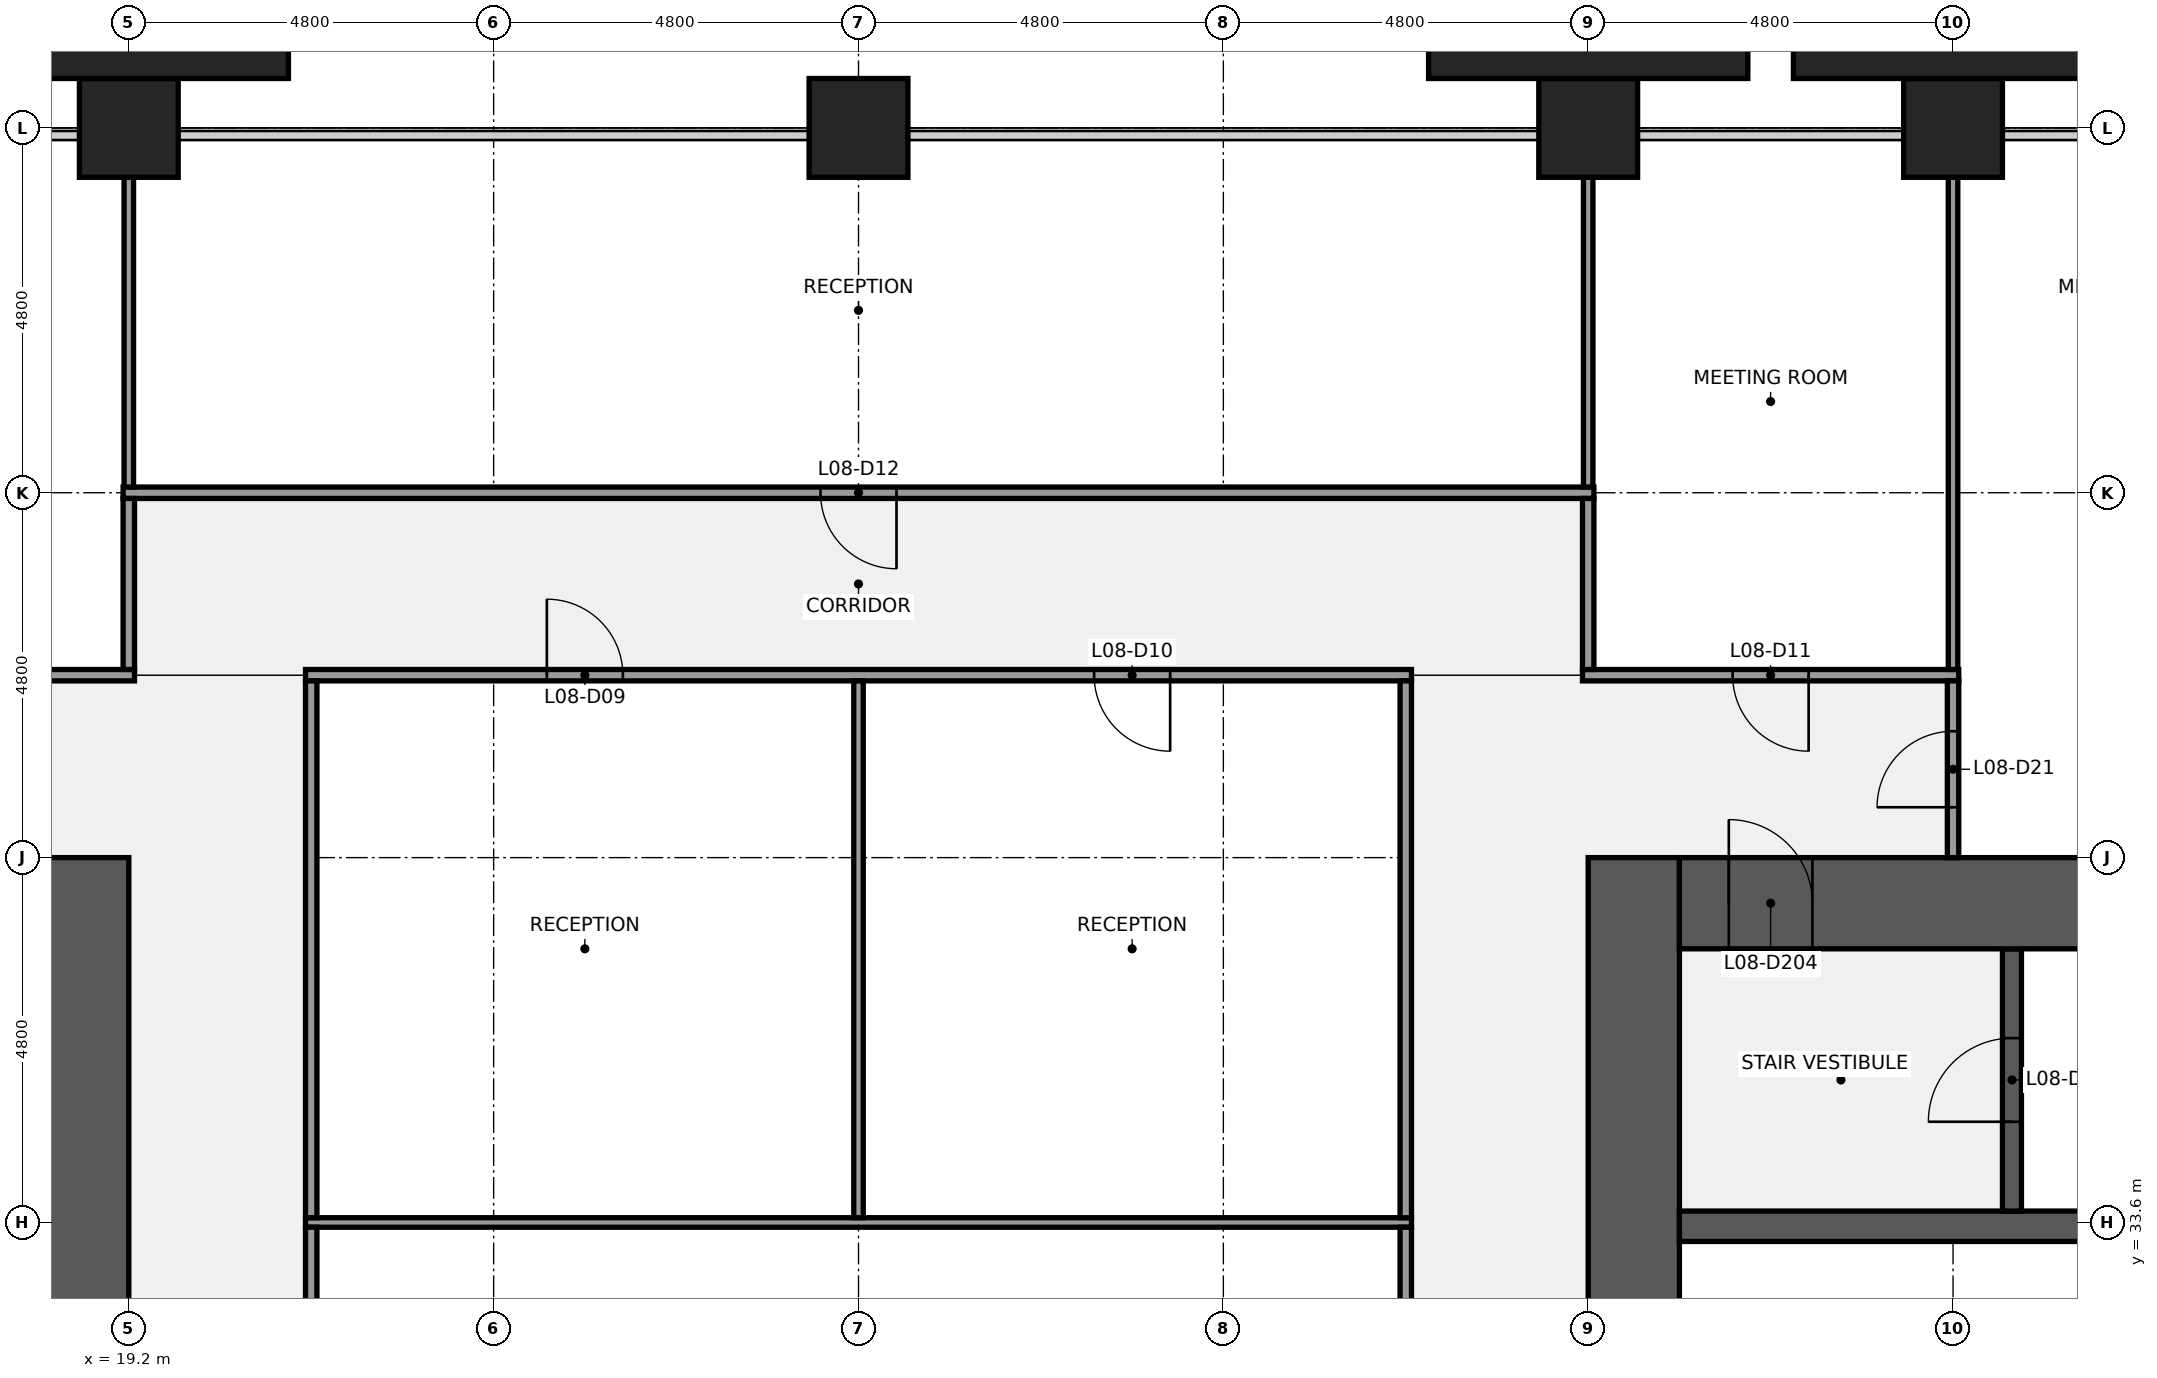
"""IFC4 building model, lengths in metres.
Left out: names, types, materials, properties, quantities, classifications, styles, units other than length and angle.
Written with IfcOpenShell. Run it as: python <this file> out.ifc"""

import sys

from ifc_helpers import new_model, si_unit, direction, frame, frame_2d, origin, origin_2d, place, context, subcontext, project, spatial, rectangle, extrude, element, fill, save


model = new_model("IFC4")
c1 = context("Model", 3, precision=1e-05, world=origin(), true_north=direction((0.0, 1.0)))
c2 = subcontext(c1, "Body", "Model", "MODEL_VIEW")
j1 = project(units=[si_unit("LENGTHUNIT", "METRE"), si_unit("PLANEANGLEUNIT", "RADIAN")], contexts=[c1])
p1 = place(None, origin())
s1 = spatial("IfcSite", under=j1, at=p1, CompositionType="ELEMENT")
p2 = place(p1, origin())
s2 = spatial("IfcBuilding", under=s1, at=p2, CompositionType="ELEMENT")
p3 = place(p2, frame((0.0, 0.0, 43.0)))
s3 = spatial("IfcBuildingStorey", under=s2, at=p3, CompositionType="ELEMENT", Elevation=43.0)
for number, where, z_axis, x_axis in (
    (1, (19.2, 48.0, 0.0), (0.0, 0.0, 1.0), (1.0, 0.0, 0.0)),
    (2, (28.8, 48.0, 0.0), (0.0, 0.0, 1.0), (1.0, 0.0, 0.0)),
    (3, (38.4, 48.0, 0.0), (0.0, 0.0, 1.0), (1.0, 0.0, 0.0)),
    (4, (43.2, 48.0, 0.0), (0.0, 0.0, 1.0), (1.0, 0.0, 0.0)),
):
    element("IfcColumn", number, at=place(p3, frame(where, z_axis=z_axis, x_axis=x_axis)), inside=s3, PredefinedType="COLUMN", context=c2, shape_type="SweptSolid", body=[
        extrude(rectangle(XDim=1.3, YDim=1.3, at=origin_2d()), origin(), (0.0, 0.0, 1.0), 4.0),
    ])
p4 = place(p3, frame((18.6, 38.4, 0.0), z_axis=(0.0, 0.0, 1.0), x_axis=(0.0, -1.0, 0.0)))
e5 = element("IfcWall", 5, at=p4, inside=s3, PredefinedType="SHEAR", context=c2, shape_type="SweptSolid", body=[
    extrude(rectangle(XDim=28.8, YDim=1.2, at=frame_2d((14.4, 0.0))), origin(), (0.0, 0.0, 1.0), 3.84),
])
p5 = place(p4, frame((18.3, 0.0, 0.0)))
e6 = element("IfcOpeningElement", 6, at=p5, cuts=e5, PredefinedType="OPENING", context=c2, shape_type="SweptSolid", body=[
    extrude(rectangle(XDim=1.8, YDim=2.1, at=frame_2d((0.9, 1.05))), frame((0.0, 0.61, 0.0), z_axis=(0.0, -1.0, 0.0), x_axis=(1.0, 0.0, 0.0)), (0.0, 0.0, 1.0), 1.22),
])
p6 = place(p4, frame((8.7, 0.0, 0.0)))
e7 = element("IfcOpeningElement", 7, at=p6, cuts=e5, PredefinedType="OPENING", context=c2, shape_type="SweptSolid", body=[
    extrude(rectangle(XDim=1.8, YDim=2.1, at=frame_2d((0.9, 1.05))), frame((0.0, 0.61, 0.0), z_axis=(0.0, -1.0, 0.0), x_axis=(1.0, 0.0, 0.0)), (0.0, 0.0, 1.0), 1.22),
])
p7 = place(p3, frame((39.0, 9.6, 0.0), z_axis=(0.0, 0.0, 1.0), x_axis=(0.0, 1.0, 0.0)))
e8 = element("IfcWall", 8, at=p7, inside=s3, PredefinedType="SHEAR", context=c2, shape_type="SweptSolid", body=[
    extrude(rectangle(XDim=28.8, YDim=1.2, at=frame_2d((14.4, 0.0))), origin(), (0.0, 0.0, 1.0), 3.84),
])
p8 = place(p7, frame((8.7, 0.0, 0.0)))
e9 = element("IfcOpeningElement", 9, at=p8, cuts=e8, PredefinedType="OPENING", context=c2, shape_type="SweptSolid", body=[
    extrude(rectangle(XDim=1.8, YDim=2.1, at=frame_2d((0.9, 1.05))), frame((0.0, 0.61, 0.0), z_axis=(0.0, -1.0, 0.0), x_axis=(1.0, 0.0, 0.0)), (0.0, 0.0, 1.0), 1.22),
])
p9 = place(p7, frame((18.3, 0.0, 0.0)))
e10 = element("IfcOpeningElement", 10, at=p9, cuts=e8, PredefinedType="OPENING", context=c2, shape_type="SweptSolid", body=[
    extrude(rectangle(XDim=1.8, YDim=2.1, at=frame_2d((0.9, 1.05))), frame((0.0, 0.61, 0.0), z_axis=(0.0, -1.0, 0.0), x_axis=(1.0, 0.0, 0.0)), (0.0, 0.0, 1.0), 1.22),
])
p10 = place(p3, frame((39.6, 33.55, 0.0), z_axis=(0.0, 0.0, 1.0), x_axis=(1.0, 0.0, 0.0)))
e11 = element("IfcWall", 11, at=p10, inside=s3, PredefinedType="SHEAR", context=c2, shape_type="SweptSolid", body=[
    extrude(rectangle(XDim=16.8, YDim=0.4, at=frame_2d((8.4, 0.0))), origin(), (0.0, 0.0, 1.0), 3.84),
])
p11 = place(p3, frame((43.975, 33.75, 0.0), z_axis=(0.0, 0.0, 1.0), x_axis=(0.0, 1.0, 0.0)))
e12 = element("IfcWall", 12, at=p11, inside=s3, PredefinedType="SHEAR", context=c2, shape_type="SweptSolid", body=[
    extrude(rectangle(XDim=3.45, YDim=0.25, at=frame_2d((1.725, 0.0))), origin(), (0.0, 0.0, 1.0), 3.84),
])
p12 = place(p11, frame((1.175, 0.0, 0.0)))
e13 = element("IfcOpeningElement", 13, at=p12, cuts=e12, PredefinedType="OPENING", context=c2, shape_type="SweptSolid", body=[
    extrude(rectangle(XDim=1.1, YDim=2.1, at=frame_2d((0.55, 1.05))), frame((0.0, 0.135, 0.0), z_axis=(0.0, -1.0, 0.0), x_axis=(1.0, 0.0, 0.0)), (0.0, 0.0, 1.0), 0.27),
])
p13 = place(p3, frame((39.6, 37.8, 0.0), z_axis=(0.0, 0.0, 1.0), x_axis=(1.0, 0.0, 0.0)))
e14 = element("IfcWall", 14, at=p13, inside=s3, PredefinedType="SHEAR", context=c2, shape_type="SweptSolid", body=[
    extrude(rectangle(XDim=13.2, YDim=1.2, at=frame_2d((6.6, 0.0))), origin(), (0.0, 0.0, 1.0), 3.84),
])
p14 = place(p13, frame((0.65, 0.0, 0.0)))
e15 = element("IfcOpeningElement", 15, at=p14, cuts=e14, PredefinedType="OPENING", context=c2, shape_type="SweptSolid", body=[
    extrude(rectangle(XDim=1.1, YDim=2.1, at=frame_2d((0.55, 1.05))), frame((0.0, 0.61, 0.0), z_axis=(0.0, -1.0, 0.0), x_axis=(1.0, 0.0, 0.0)), (0.0, 0.0, 1.0), 1.22),
])
p15 = place(p3, frame((21.525, 33.6, 0.0), z_axis=(0.0, 0.0, 1.0), x_axis=(1.0, 0.0, 0.0)))
e16 = element("IfcWall", 16, at=p15, inside=s3, PredefinedType="PARTITIONING", context=c2, shape_type="SweptSolid", body=[
    extrude(rectangle(XDim=14.55, YDim=0.125, at=frame_2d((7.275, 0.0))), origin(), (0.0, 0.0, 1.0), 2.849),
])
p16 = place(p3, frame((14.325, 40.8, 0.0), z_axis=(0.0, 0.0, 1.0), x_axis=(1.0, 0.0, 0.0)))
e17 = element("IfcWall", 17, at=p16, inside=s3, PredefinedType="PARTITIONING", context=c2, shape_type="SweptSolid", body=[
    extrude(rectangle(XDim=4.95, YDim=0.15, at=frame_2d((2.475, 0.0))), origin(), (0.0, 0.0, 1.0), 2.849),
])
p17 = place(p16, frame((1.975, 0.0, 0.0)))
e18 = element("IfcOpeningElement", 18, at=p17, cuts=e17, PredefinedType="OPENING", context=c2, shape_type="SweptSolid", body=[
    extrude(rectangle(XDim=1.0, YDim=2.1, at=frame_2d((0.5, 1.05))), frame((0.0, 0.085, 0.0), z_axis=(0.0, -1.0, 0.0), x_axis=(1.0, 0.0, 0.0)), (0.0, 0.0, 1.0), 0.17),
])
p18 = place(p3, frame((21.525, 40.8, 0.0), z_axis=(0.0, 0.0, 1.0), x_axis=(1.0, 0.0, 0.0)))
e19 = element("IfcWall", 19, at=p18, inside=s3, PredefinedType="PARTITIONING", context=c2, shape_type="SweptSolid", body=[
    extrude(rectangle(XDim=14.55, YDim=0.15, at=frame_2d((7.275, 0.0))), origin(), (0.0, 0.0, 1.0), 2.849),
])
p19 = place(p18, frame((3.175, 0.0, 0.0)))
e20 = element("IfcOpeningElement", 20, at=p19, cuts=e19, PredefinedType="OPENING", context=c2, shape_type="SweptSolid", body=[
    extrude(rectangle(XDim=1.0, YDim=2.1, at=frame_2d((0.5, 1.05))), frame((0.0, 0.085, 0.0), z_axis=(0.0, -1.0, 0.0), x_axis=(1.0, 0.0, 0.0)), (0.0, 0.0, 1.0), 0.17),
])
p20 = place(p18, frame((10.375, 0.0, 0.0)))
e21 = element("IfcOpeningElement", 21, at=p20, cuts=e19, PredefinedType="OPENING", context=c2, shape_type="SweptSolid", body=[
    extrude(rectangle(XDim=1.0, YDim=2.1, at=frame_2d((0.5, 1.05))), frame((0.0, 0.085, 0.0), z_axis=(0.0, -1.0, 0.0), x_axis=(1.0, 0.0, 0.0)), (0.0, 0.0, 1.0), 0.17),
])
p21 = place(p3, frame((38.325, 40.8, 0.0), z_axis=(0.0, 0.0, 1.0), x_axis=(1.0, 0.0, 0.0)))
e22 = element("IfcWall", 22, at=p21, inside=s3, PredefinedType="PARTITIONING", context=c2, shape_type="SweptSolid", body=[
    extrude(rectangle(XDim=4.95, YDim=0.15, at=frame_2d((2.475, 0.0))), origin(), (0.0, 0.0, 1.0), 2.849),
])
p22 = place(p21, frame((1.975, 0.0, 0.0)))
e23 = element("IfcOpeningElement", 23, at=p22, cuts=e22, PredefinedType="OPENING", context=c2, shape_type="SweptSolid", body=[
    extrude(rectangle(XDim=1.0, YDim=2.1, at=frame_2d((0.5, 1.05))), frame((0.0, 0.085, 0.0), z_axis=(0.0, -1.0, 0.0), x_axis=(1.0, 0.0, 0.0)), (0.0, 0.0, 1.0), 0.17),
])
p23 = place(p3, frame((19.125, 43.2, 0.0), z_axis=(0.0, 0.0, 1.0), x_axis=(1.0, 0.0, 0.0)))
e24 = element("IfcWall", 24, at=p23, inside=s3, PredefinedType="PARTITIONING", context=c2, shape_type="SweptSolid", body=[
    extrude(rectangle(XDim=19.35, YDim=0.15, at=frame_2d((9.675, 0.0))), origin(), (0.0, 0.0, 1.0), 2.849),
])
p24 = place(p23, frame((9.175, 0.0, 0.0)))
e25 = element("IfcOpeningElement", 25, at=p24, cuts=e24, PredefinedType="OPENING", context=c2, shape_type="SweptSolid", body=[
    extrude(rectangle(XDim=1.0, YDim=2.1, at=frame_2d((0.5, 1.05))), frame((0.0, 0.085, 0.0), z_axis=(0.0, -1.0, 0.0), x_axis=(1.0, 0.0, 0.0)), (0.0, 0.0, 1.0), 0.17),
])
p25 = place(p3, frame((19.2, 43.275, 0.0), z_axis=(0.0, 0.0, 1.0), x_axis=(0.0, 1.0, 0.0)))
e26 = element("IfcWall", 26, at=p25, inside=s3, PredefinedType="PARTITIONING", context=c2, shape_type="SweptSolid", body=[
    extrude(rectangle(XDim=4.075, YDim=0.125, at=frame_2d((2.038, 0.0))), origin(), (0.0, 0.0, 1.0), 2.849),
])
p26 = place(p3, frame((19.2, 40.875, 0.0), z_axis=(0.0, 0.0, 1.0), x_axis=(0.0, 1.0, 0.0)))
e27 = element("IfcWall", 27, at=p26, inside=s3, PredefinedType="PARTITIONING", context=c2, shape_type="SweptSolid", body=[
    extrude(rectangle(XDim=2.25, YDim=0.15, at=frame_2d((1.125, 0.0))), origin(), (0.0, 0.0, 1.0), 2.849),
])
p27 = place(p3, frame((21.6, 24.062, 0.0), z_axis=(0.0, 0.0, 1.0), x_axis=(0.0, 1.0, 0.0)))
e28 = element("IfcWall", 28, at=p27, inside=s3, PredefinedType="PARTITIONING", context=c2, shape_type="SweptSolid", body=[
    extrude(rectangle(XDim=9.475, YDim=0.15, at=frame_2d((4.738, 0.0))), origin(), (0.0, 0.0, 1.0), 2.849),
])
p28 = place(p27, frame((4.238, 0.0, 0.0)))
e29 = element("IfcOpeningElement", 29, at=p28, cuts=e28, PredefinedType="OPENING", context=c2, shape_type="SweptSolid", body=[
    extrude(rectangle(XDim=1.0, YDim=2.1, at=frame_2d((0.5, 1.05))), frame((0.0, 0.085, 0.0), z_axis=(0.0, -1.0, 0.0), x_axis=(1.0, 0.0, 0.0)), (0.0, 0.0, 1.0), 0.17),
])
p29 = place(p3, frame((21.6, 33.663, 0.0), z_axis=(0.0, 0.0, 1.0), x_axis=(0.0, 1.0, 0.0)))
e30 = element("IfcWall", 30, at=p29, inside=s3, PredefinedType="PARTITIONING", context=c2, shape_type="SweptSolid", body=[
    extrude(rectangle(XDim=7.062, YDim=0.15, at=frame_2d((3.531, 0.0))), origin(), (0.0, 0.0, 1.0), 2.849),
])
p30 = place(p3, frame((28.8, 33.663, 0.0), z_axis=(0.0, 0.0, 1.0), x_axis=(0.0, 1.0, 0.0)))
e31 = element("IfcWall", 31, at=p30, inside=s3, PredefinedType="PARTITIONING", context=c2, shape_type="SweptSolid", body=[
    extrude(rectangle(XDim=7.062, YDim=0.125, at=frame_2d((3.531, 0.0))), origin(), (0.0, 0.0, 1.0), 2.849),
])
p31 = place(p3, frame((36.0, 24.062, 0.0), z_axis=(0.0, 0.0, 1.0), x_axis=(0.0, 1.0, 0.0)))
e32 = element("IfcWall", 32, at=p31, inside=s3, PredefinedType="PARTITIONING", context=c2, shape_type="SweptSolid", body=[
    extrude(rectangle(XDim=9.475, YDim=0.15, at=frame_2d((4.738, 0.0))), origin(), (0.0, 0.0, 1.0), 2.849),
])
p32 = place(p3, frame((36.0, 33.663, 0.0), z_axis=(0.0, 0.0, 1.0), x_axis=(0.0, 1.0, 0.0)))
e33 = element("IfcWall", 33, at=p32, inside=s3, PredefinedType="PARTITIONING", context=c2, shape_type="SweptSolid", body=[
    extrude(rectangle(XDim=7.062, YDim=0.15, at=frame_2d((3.531, 0.0))), origin(), (0.0, 0.0, 1.0), 2.849),
])
p33 = place(p3, frame((38.4, 43.275, 0.0), z_axis=(0.0, 0.0, 1.0), x_axis=(0.0, 1.0, 0.0)))
e34 = element("IfcWall", 34, at=p33, inside=s3, PredefinedType="PARTITIONING", context=c2, shape_type="SweptSolid", body=[
    extrude(rectangle(XDim=4.075, YDim=0.125, at=frame_2d((2.038, 0.0))), origin(), (0.0, 0.0, 1.0), 2.849),
])
p34 = place(p3, frame((38.4, 40.875, 0.0), z_axis=(0.0, 0.0, 1.0), x_axis=(0.0, 1.0, 0.0)))
e35 = element("IfcWall", 35, at=p34, inside=s3, PredefinedType="PARTITIONING", context=c2, shape_type="SweptSolid", body=[
    extrude(rectangle(XDim=2.25, YDim=0.15, at=frame_2d((1.125, 0.0))), origin(), (0.0, 0.0, 1.0), 2.849),
])
p35 = place(p3, frame((43.2, 40.875, 0.0), z_axis=(0.0, 0.0, 1.0), x_axis=(0.0, 1.0, 0.0)))
e36 = element("IfcWall", 36, at=p35, inside=s3, PredefinedType="PARTITIONING", context=c2, shape_type="SweptSolid", body=[
    extrude(rectangle(XDim=6.475, YDim=0.125, at=frame_2d((3.238, 0.0))), origin(), (0.0, 0.0, 1.0), 2.849),
])
p36 = place(p3, frame((43.2, 38.4, 0.0), z_axis=(0.0, 0.0, 1.0), x_axis=(0.0, 1.0, 0.0)))
e37 = element("IfcWall", 37, at=p36, inside=s3, PredefinedType="PARTITIONING", context=c2, shape_type="SweptSolid", body=[
    extrude(rectangle(XDim=2.325, YDim=0.15, at=frame_2d((1.163, 0.0))), origin(), (0.0, 0.0, 1.0), 2.849),
])
p37 = place(p36, frame((0.663, 0.0, 0.0)))
e38 = element("IfcOpeningElement", 38, at=p37, cuts=e37, PredefinedType="OPENING", context=c2, shape_type="SweptSolid", body=[
    extrude(rectangle(XDim=1.0, YDim=2.1, at=frame_2d((0.5, 1.05))), frame((0.0, 0.085, 0.0), z_axis=(0.0, -1.0, 0.0), x_axis=(1.0, 0.0, 0.0)), (0.0, 0.0, 1.0), 0.17),
])
for number, where, z_axis, x_axis in (
    (39, (19.2, 49.075, 0.0), (0.0, 0.0, 1.0), (1.0, 0.0, 0.0)),
    (40, (38.4, 49.075, 0.0), (0.0, 0.0, 1.0), (1.0, 0.0, 0.0)),
    (41, (43.2, 49.075, 0.0), (0.0, 0.0, 1.0), (1.0, 0.0, 0.0)),
):
    element("IfcColumn", number, at=place(p3, frame(where, z_axis=z_axis, x_axis=x_axis)), inside=s3, PredefinedType="PILASTER", context=c2, shape_type="SweptSolid", body=[
        extrude(rectangle(XDim=4.2, YDim=0.85, at=origin_2d()), origin(), (0.0, 0.0, 1.0), 4.0),
    ])
p38 = place(p12, origin())
e42 = element("IfcDoor", 42, at=p38, inside=s3, OperationType="SINGLE_SWING_LEFT", PredefinedType="DOOR", context=c2, shape_type="SweptSolid", body=[
    extrude(rectangle(XDim=1.1, YDim=2.1, at=frame_2d((0.55, 1.05))), frame((0.0, 0.025, 0.0), z_axis=(0.0, -1.0, 0.0), x_axis=(1.0, 0.0, 0.0)), (0.0, 0.0, 1.0), 0.05),
])
fill(e13, e42)
p39 = place(p14, origin())
e43 = element("IfcDoor", 43, at=p39, inside=s3, OperationType="SINGLE_SWING_LEFT", PredefinedType="DOOR", context=c2, shape_type="SweptSolid", body=[
    extrude(rectangle(XDim=1.1, YDim=2.1, at=frame_2d((0.55, 1.05))), frame((0.0, 0.025, 0.0), z_axis=(0.0, -1.0, 0.0), x_axis=(1.0, 0.0, 0.0)), (0.0, 0.0, 1.0), 0.05),
])
fill(e15, e43)
p40 = place(p19, origin())
e44 = element("IfcDoor", 44, at=p40, inside=s3, OperationType="SINGLE_SWING_LEFT", PredefinedType="DOOR", context=c2, shape_type="SweptSolid", body=[
    extrude(rectangle(XDim=1.0, YDim=2.1, at=frame_2d((0.5, 1.05))), frame((0.0, 0.025, 0.0), z_axis=(0.0, -1.0, 0.0), x_axis=(1.0, 0.0, 0.0)), (0.0, 0.0, 1.0), 0.05),
])
fill(e20, e44)
p41 = place(p20, origin())
e45 = element("IfcDoor", 45, at=p41, inside=s3, OperationType="SINGLE_SWING_RIGHT", PredefinedType="DOOR", context=c2, shape_type="SweptSolid", body=[
    extrude(rectangle(XDim=1.0, YDim=2.1, at=frame_2d((0.5, 1.05))), frame((0.0, 0.025, 0.0), z_axis=(0.0, -1.0, 0.0), x_axis=(1.0, 0.0, 0.0)), (0.0, 0.0, 1.0), 0.05),
])
fill(e21, e45)
p42 = place(p22, origin())
e46 = element("IfcDoor", 46, at=p42, inside=s3, OperationType="SINGLE_SWING_RIGHT", PredefinedType="DOOR", context=c2, shape_type="SweptSolid", body=[
    extrude(rectangle(XDim=1.0, YDim=2.1, at=frame_2d((0.5, 1.05))), frame((0.0, 0.025, 0.0), z_axis=(0.0, -1.0, 0.0), x_axis=(1.0, 0.0, 0.0)), (0.0, 0.0, 1.0), 0.05),
])
fill(e23, e46)
p43 = place(p24, origin())
e47 = element("IfcDoor", 47, at=p43, inside=s3, OperationType="SINGLE_SWING_RIGHT", PredefinedType="DOOR", context=c2, shape_type="SweptSolid", body=[
    extrude(rectangle(XDim=1.0, YDim=2.1, at=frame_2d((0.5, 1.05))), frame((0.0, 0.025, 0.0), z_axis=(0.0, -1.0, 0.0), x_axis=(1.0, 0.0, 0.0)), (0.0, 0.0, 1.0), 0.05),
])
fill(e25, e47)
p44 = place(p37, origin())
e48 = element("IfcDoor", 48, at=p44, inside=s3, OperationType="SINGLE_SWING_LEFT", PredefinedType="DOOR", context=c2, shape_type="SweptSolid", body=[
    extrude(rectangle(XDim=1.0, YDim=2.1, at=frame_2d((0.5, 1.05))), frame((0.0, 0.025, 0.0), z_axis=(0.0, -1.0, 0.0), x_axis=(1.0, 0.0, 0.0)), (0.0, 0.0, 1.0), 0.05),
])
fill(e38, e48)
save(model, sys.argv[1])
